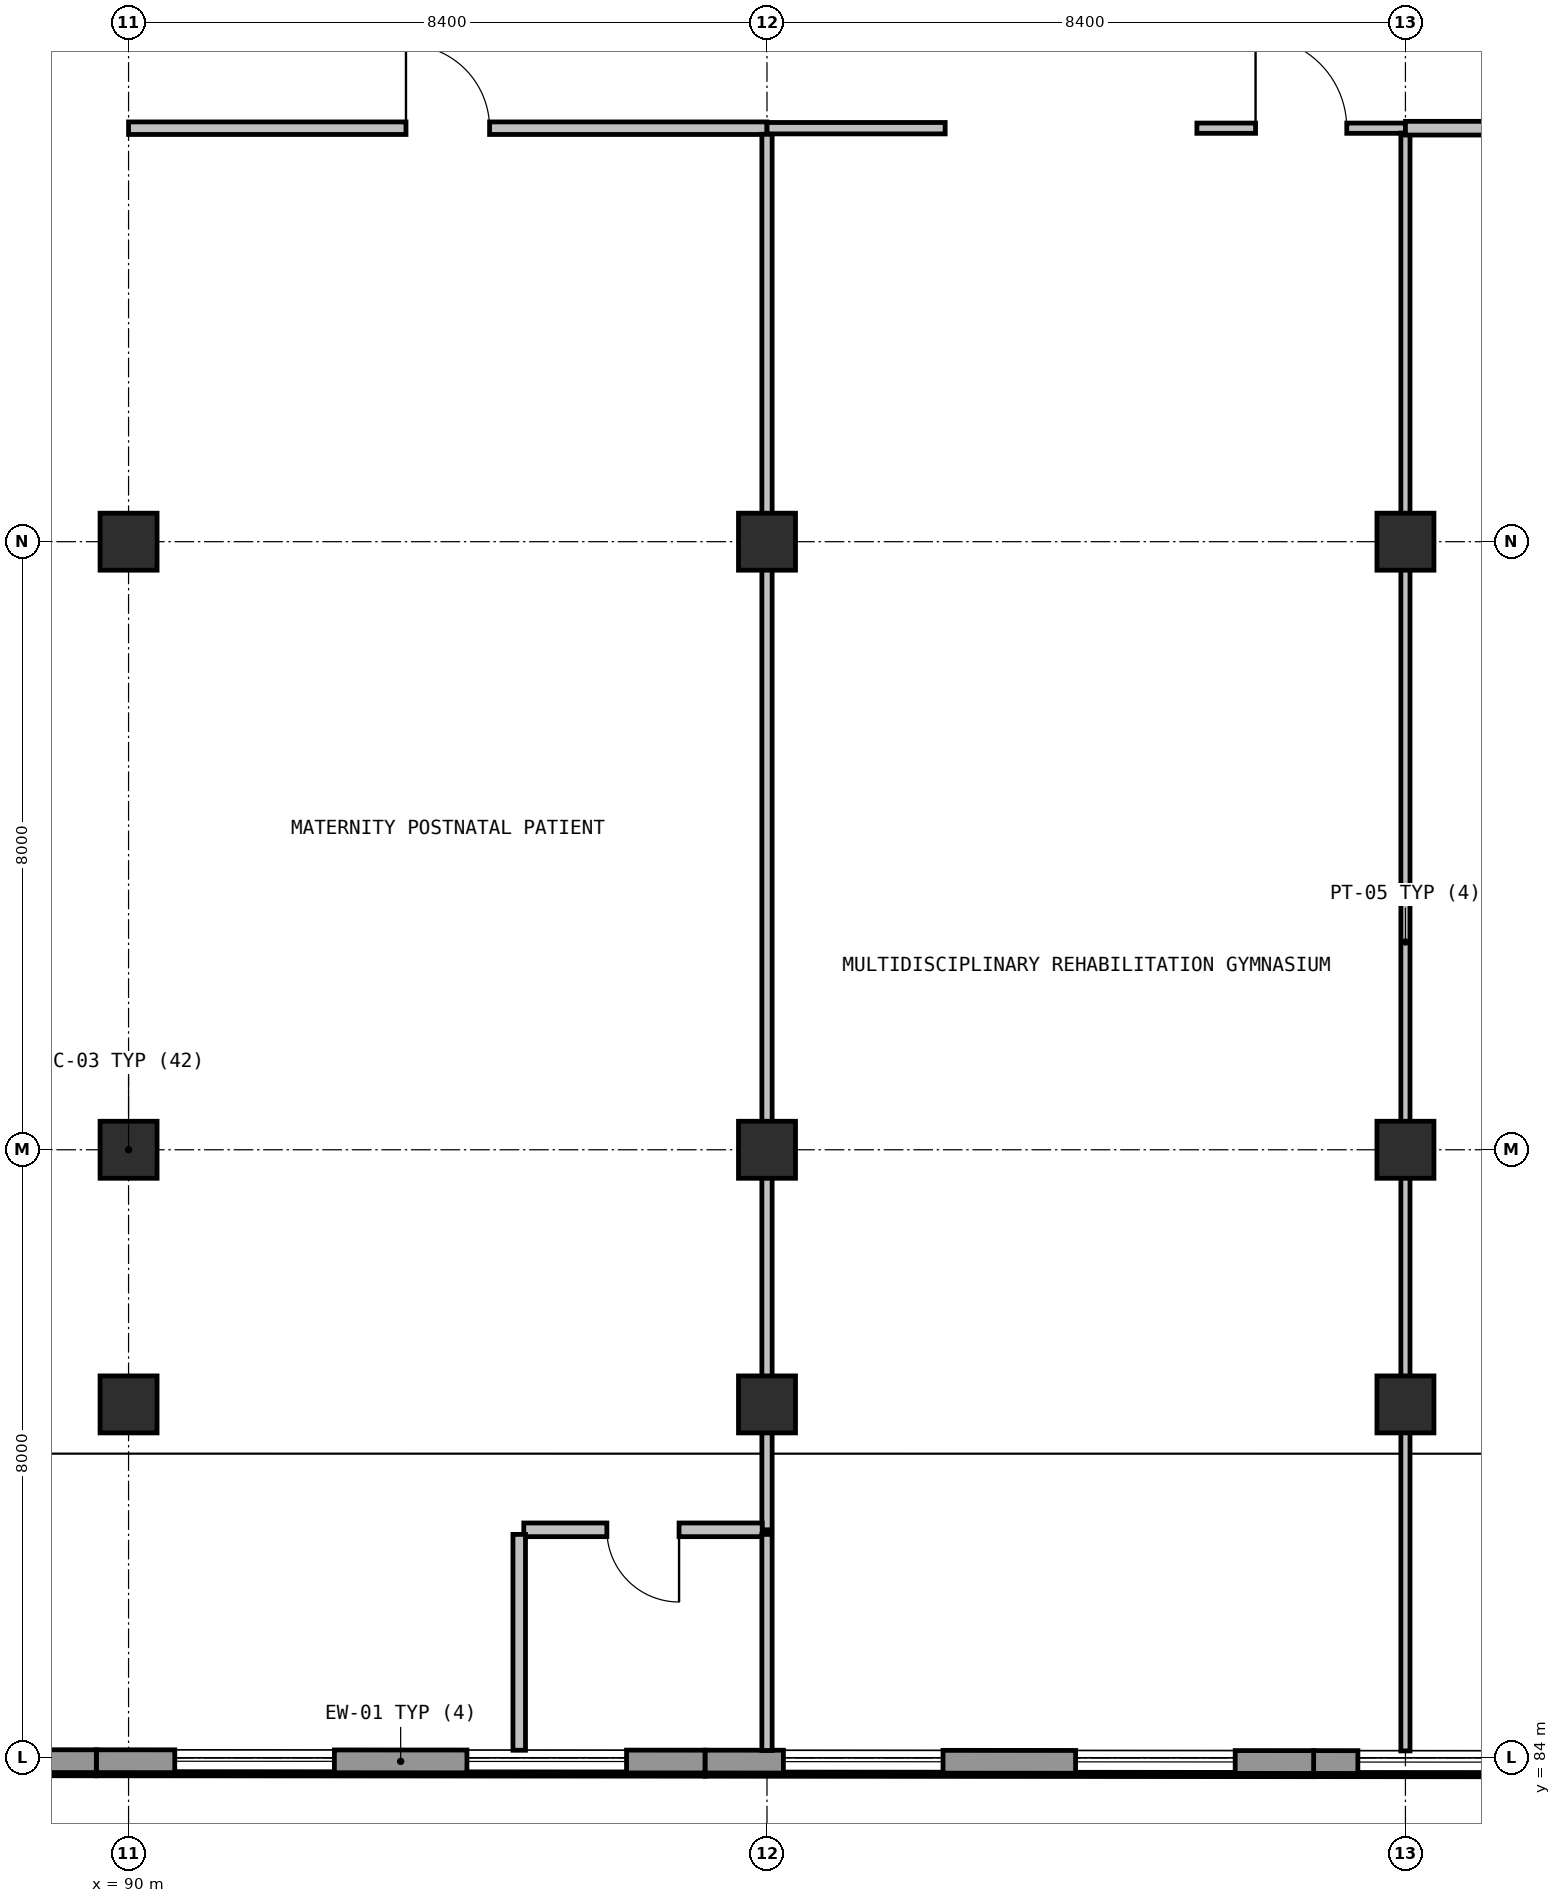
"""IFC4 building model, lengths in metres.
Left out: names, types, materials, properties, quantities, classifications, styles, units other than length and angle.
Written with IfcOpenShell. Run it as: python <this file> out.ifc"""

import sys

from ifc_helpers import new_model, si_unit, direction, frame, frame_2d, origin, origin_2d, place, context, subcontext, project, spatial, rectangle, extrude, element, fill, save


model = new_model("IFC4")
c1 = context("Model", 3, precision=1e-05, world=origin(), true_north=direction((0.0, 1.0)))
c2 = subcontext(c1, "Body", "Model", "MODEL_VIEW")
j1 = project(units=[si_unit("LENGTHUNIT", "METRE"), si_unit("PLANEANGLEUNIT", "RADIAN")], contexts=[c1])
p1 = place(None, origin())
s1 = spatial("IfcSite", under=j1, at=p1, CompositionType="ELEMENT")
p2 = place(p1, origin())
s2 = spatial("IfcBuilding", under=s1, at=p2, CompositionType="ELEMENT")
p3 = place(p2, frame((0.0, 0.0, 19.2)))
s3 = spatial("IfcBuildingStorey", under=s2, at=p3, CompositionType="ELEMENT", Elevation=19.2)
for number, where, z_axis, x_axis in (
    (1, (90.0, 88.65, 0.0), (0.0, 0.0, 1.0), (1.0, 0.0, 0.0)),
    (2, (90.0, 92.0, 0.0), (0.0, 0.0, 1.0), (1.0, 0.0, 0.0)),
    (3, (90.0, 100.0, 0.0), (0.0, 0.0, 1.0), (1.0, 0.0, 0.0)),
    (4, (98.4, 88.65, 0.0), (0.0, 0.0, 1.0), (1.0, 0.0, 0.0)),
    (5, (98.4, 92.0, 0.0), (0.0, 0.0, 1.0), (1.0, 0.0, 0.0)),
    (6, (98.4, 100.0, 0.0), (0.0, 0.0, 1.0), (1.0, 0.0, 0.0)),
    (7, (106.8, 88.65, 0.0), (0.0, 0.0, 1.0), (1.0, 0.0, 0.0)),
    (8, (106.8, 92.0, 0.0), (0.0, 0.0, 1.0), (1.0, 0.0, 0.0)),
    (9, (106.8, 100.0, 0.0), (0.0, 0.0, 1.0), (1.0, 0.0, 0.0)),
):
    element("IfcColumn", number, at=place(p3, frame(where, z_axis=z_axis, x_axis=x_axis)), inside=s3, PredefinedType="COLUMN", context=c2, shape_type="SweptSolid", body=[
        extrude(rectangle(XDim=0.75, YDim=0.75, at=origin_2d()), origin(), (0.0, 0.0, 1.0), 4.05),
    ])
p4 = place(p3, frame((113.6, 83.94, 0.0), z_axis=(0.0, 0.0, 1.0), x_axis=(-0.999999795056, 0.000640224252, 0.0)))
e10 = element("IfcWall", 10, at=p4, inside=s3, PredefinedType="SOLIDWALL", context=c2, shape_type="SweptSolid", body=[
    extrude(rectangle(XDim=8.008, YDim=0.3, at=frame_2d((4.004, 0.0))), origin(), (0.0, 0.0, 1.0), 3.77),
])
p5 = place(p4, frame((0.882, 0.0, 0.96)))
e11 = element("IfcOpeningElement", 11, at=p5, cuts=e10, PredefinedType="OPENING", context=c2, shape_type="SweptSolid", body=[
    extrude(rectangle(XDim=2.4, YDim=1.2, at=frame_2d((1.2, 0.6))), frame((0.0, 0.16, 0.0), z_axis=(0.0, -1.0, 0.0), x_axis=(1.0, 0.0, 0.0)), (0.0, 0.0, 1.0), 0.32),
])
p6 = place(p4, frame((4.426, 0.0, 0.96)))
e12 = element("IfcOpeningElement", 12, at=p6, cuts=e10, PredefinedType="OPENING", context=c2, shape_type="SweptSolid", body=[
    extrude(rectangle(XDim=3.0, YDim=1.35, at=frame_2d((1.5, 0.675))), frame((0.0, 0.16, 0.0), z_axis=(0.0, -1.0, 0.0), x_axis=(1.0, 0.0, 0.0)), (0.0, 0.0, 1.0), 0.32),
])
p7 = place(p3, frame((105.592, 83.945, 0.0), z_axis=(0.0, 0.0, 1.0), x_axis=(-0.999999732319, 0.000731684814, 0.0)))
e13 = element("IfcWall", 13, at=p7, inside=s3, PredefinedType="SOLIDWALL", context=c2, shape_type="SweptSolid", body=[
    extrude(rectangle(XDim=8.008, YDim=0.3, at=frame_2d((4.004, 0.0))), origin(), (0.0, 0.0, 1.0), 3.77),
])
p8 = place(p7, frame((1.032, 0.0, 0.96)))
e14 = element("IfcOpeningElement", 14, at=p8, cuts=e13, PredefinedType="OPENING", context=c2, shape_type="SweptSolid", body=[
    extrude(rectangle(XDim=2.1, YDim=1.5, at=frame_2d((1.05, 0.75))), frame((0.0, 0.16, 0.0), z_axis=(0.0, -1.0, 0.0), x_axis=(1.0, 0.0, 0.0)), (0.0, 0.0, 1.0), 0.32),
])
p9 = place(p7, frame((4.876, 0.0, 0.96)))
e15 = element("IfcOpeningElement", 15, at=p9, cuts=e13, PredefinedType="OPENING", context=c2, shape_type="SweptSolid", body=[
    extrude(rectangle(XDim=2.1, YDim=1.5, at=frame_2d((1.05, 0.75))), frame((0.0, 0.16, 0.0), z_axis=(0.0, -1.0, 0.0), x_axis=(1.0, 0.0, 0.0)), (0.0, 0.0, 1.0), 0.32),
])
p10 = place(p3, frame((97.584, 83.951, 0.0), z_axis=(0.0, 0.0, 1.0), x_axis=(-0.999999795056, 0.000640224252, 0.0)))
e16 = element("IfcWall", 16, at=p10, inside=s3, PredefinedType="SOLIDWALL", context=c2, shape_type="SweptSolid", body=[
    extrude(rectangle(XDim=8.008, YDim=0.3, at=frame_2d((4.004, 0.0))), origin(), (0.0, 0.0, 1.0), 3.77),
])
p11 = place(p10, frame((1.032, 0.0, 0.96)))
e17 = element("IfcOpeningElement", 17, at=p11, cuts=e16, PredefinedType="OPENING", context=c2, shape_type="SweptSolid", body=[
    extrude(rectangle(XDim=2.1, YDim=1.5, at=frame_2d((1.05, 0.75))), frame((0.0, 0.16, 0.0), z_axis=(0.0, -1.0, 0.0), x_axis=(1.0, 0.0, 0.0)), (0.0, 0.0, 1.0), 0.32),
])
p12 = place(p10, frame((4.876, 0.0, 0.96)))
e18 = element("IfcOpeningElement", 18, at=p12, cuts=e16, PredefinedType="OPENING", context=c2, shape_type="SweptSolid", body=[
    extrude(rectangle(XDim=2.1, YDim=1.5, at=frame_2d((1.05, 0.75))), frame((0.0, 0.16, 0.0), z_axis=(0.0, -1.0, 0.0), x_axis=(1.0, 0.0, 0.0)), (0.0, 0.0, 1.0), 0.32),
])
p13 = place(p3, frame((89.576, 83.956, 0.0), z_axis=(0.0, 0.0, 1.0), x_axis=(-0.999999814099, 0.000609755984, 0.0)))
e19 = element("IfcWall", 19, at=p13, inside=s3, PredefinedType="SOLIDWALL", context=c2, shape_type="SweptSolid", body=[
    extrude(rectangle(XDim=8.008, YDim=0.3, at=frame_2d((4.004, 0.0))), origin(), (0.0, 0.0, 1.0), 3.77),
])
p14 = place(p13, frame((1.032, 0.0, 0.96)))
e20 = element("IfcOpeningElement", 20, at=p14, cuts=e19, PredefinedType="OPENING", context=c2, shape_type="SweptSolid", body=[
    extrude(rectangle(XDim=2.1, YDim=1.5, at=frame_2d((1.05, 0.75))), frame((0.0, 0.16, 0.0), z_axis=(0.0, -1.0, 0.0), x_axis=(1.0, 0.0, 0.0)), (0.0, 0.0, 1.0), 0.32),
])
p15 = place(p13, frame((4.876, 0.0, 0.96)))
e21 = element("IfcOpeningElement", 21, at=p15, cuts=e19, PredefinedType="OPENING", context=c2, shape_type="SweptSolid", body=[
    extrude(rectangle(XDim=2.1, YDim=1.5, at=frame_2d((1.05, 0.75))), frame((0.0, 0.16, 0.0), z_axis=(0.0, -1.0, 0.0), x_axis=(1.0, 0.0, 0.0)), (0.0, 0.0, 1.0), 0.32),
])
p16 = place(p3, frame((90.0, 105.44, 0.0), z_axis=(0.0, 0.0, 1.0), x_axis=(1.0, 0.0, 0.0)))
e22 = element("IfcWall", 22, at=p16, inside=s3, PredefinedType="PARTITIONING", context=c2, shape_type="SweptSolid", body=[
    extrude(rectangle(XDim=8.4, YDim=0.165, at=frame_2d((4.2, 0.0))), origin(), (0.0, 0.0, 1.0), 3.77),
])
p17 = place(p16, frame((3.65, 0.0, 0.0)))
e23 = element("IfcOpeningElement", 23, at=p17, cuts=e22, PredefinedType="OPENING", context=c2, shape_type="SweptSolid", body=[
    extrude(rectangle(XDim=1.1, YDim=2.15, at=frame_2d((0.55, 1.075))), frame((0.0, 0.093, 0.0), z_axis=(0.0, -1.0, 0.0), x_axis=(1.0, 0.0, 0.0)), (0.0, 0.0, 1.0), 0.185),
])
p18 = place(p3, frame((98.4, 105.361, 0.0), z_axis=(0.0, 0.0, 1.0), x_axis=(0.0, -1.0, 0.0)))
e24 = element("IfcWall", 24, at=p18, inside=s3, PredefinedType="PARTITIONING", context=c2, shape_type="SweptSolid", body=[
    extrude(rectangle(XDim=18.361, YDim=0.135, at=frame_2d((9.181, 0.0))), origin(), (0.0, 0.0, 1.0), 3.12),
])
p19 = place(p3, frame((98.337, 87.0, 0.0), z_axis=(0.0, 0.0, 1.0), x_axis=(-1.0, 0.0, 0.0)))
e25 = element("IfcWall", 25, at=p19, inside=s3, PredefinedType="PARTITIONING", context=c2, shape_type="SweptSolid", body=[
    extrude(rectangle(XDim=3.137, YDim=0.18, at=frame_2d((1.568, 0.0))), origin(), (0.0, 0.0, 1.0), 3.77),
])
p20 = place(p19, frame((1.094, 0.0, 0.0)))
e26 = element("IfcOpeningElement", 26, at=p20, cuts=e25, PredefinedType="OPENING", context=c2, shape_type="SweptSolid", body=[
    extrude(rectangle(XDim=0.95, YDim=2.1, at=frame_2d((0.475, 1.05))), frame((0.0, 0.1, 0.0), z_axis=(0.0, -1.0, 0.0), x_axis=(1.0, 0.0, 0.0)), (0.0, 0.0, 1.0), 0.2),
])
p21 = place(p3, frame((95.14, 86.94, 0.0), z_axis=(0.0, 0.0, 1.0), x_axis=(0.0, -1.0, 0.0)))
e27 = element("IfcWall", 27, at=p21, inside=s3, PredefinedType="PARTITIONING", context=c2, shape_type="SweptSolid", body=[
    extrude(rectangle(XDim=2.84, YDim=0.165, at=frame_2d((1.42, 0.0))), origin(), (0.0, 0.0, 1.0), 3.77),
])
p22 = place(p3, frame((98.4, 86.94, 0.0), z_axis=(0.0, 0.0, 1.0), x_axis=(0.0, -1.0, 0.0)))
e28 = element("IfcWall", 28, at=p22, inside=s3, PredefinedType="PARTITIONING", context=c2, shape_type="SweptSolid", body=[
    extrude(rectangle(XDim=2.843, YDim=0.135, at=frame_2d((1.421, 0.0))), origin(), (0.0, 0.0, 1.0), 3.77),
])
p23 = place(p3, frame((98.4, 105.44, 0.0), z_axis=(0.0, 0.0, 1.0), x_axis=(1.0, 0.0, 0.0)))
e29 = element("IfcWall", 29, at=p23, inside=s3, PredefinedType="PARTITIONING", context=c2, shape_type="SweptSolid", body=[
    extrude(rectangle(XDim=2.344, YDim=0.15, at=frame_2d((1.172, 0.0))), origin(), (0.0, 0.0, 1.0), 3.77),
])
p24 = place(p3, frame((104.056, 105.44, 0.0), z_axis=(0.0, 0.0, 1.0), x_axis=(1.0, 0.0, 0.0)))
e30 = element("IfcWall", 30, at=p24, inside=s3, PredefinedType="PARTITIONING", context=c2, shape_type="SweptSolid", body=[
    extrude(rectangle(XDim=2.744, YDim=0.135, at=frame_2d((1.372, 0.0))), origin(), (0.0, 0.0, 1.0), 3.77),
])
p25 = place(p24, frame((0.772, 0.0, 0.0)))
e31 = element("IfcOpeningElement", 31, at=p25, cuts=e30, PredefinedType="OPENING", context=c2, shape_type="SweptSolid", body=[
    extrude(rectangle(XDim=1.2, YDim=2.15, at=frame_2d((0.6, 1.075))), frame((0.0, 0.077, 0.0), z_axis=(0.0, -1.0, 0.0), x_axis=(1.0, 0.0, 0.0)), (0.0, 0.0, 1.0), 0.155),
])
p26 = place(p3, frame((106.8, 105.376, 0.0), z_axis=(0.0, 0.0, 1.0), x_axis=(0.0, -1.0, 0.0)))
e32 = element("IfcWall", 32, at=p26, inside=s3, PredefinedType="PARTITIONING", context=c2, shape_type="SweptSolid", body=[
    extrude(rectangle(XDim=21.285, YDim=0.12, at=frame_2d((10.643, 0.0))), origin(), (0.0, 0.0, 1.0), 3.12),
])
p27 = place(p3, frame((106.8, 105.44, 0.0), z_axis=(0.0, 0.0, 1.0), x_axis=(1.0, 0.0, 0.0)))
e33 = element("IfcWall", 33, at=p27, inside=s3, PredefinedType="PARTITIONING", context=c2, shape_type="SweptSolid", body=[
    extrude(rectangle(XDim=6.744, YDim=0.18, at=frame_2d((3.372, 0.0))), origin(), (0.0, 0.0, 1.0), 3.77),
])
p28 = place(p6, origin())
e34 = element("IfcWindow", 34, at=p28, inside=s3, PartitioningType="SINGLE_PANEL", PredefinedType="WINDOW", context=c2, shape_type="SweptSolid", body=[
    extrude(rectangle(XDim=3.0, YDim=1.35, at=frame_2d((1.5, 0.675))), frame((0.0, 0.03, 0.0), z_axis=(0.0, -1.0, 0.0), x_axis=(1.0, 0.0, 0.0)), (0.0, 0.0, 1.0), 0.06),
])
fill(e12, e34)
p29 = place(p8, origin())
e35 = element("IfcWindow", 35, at=p29, inside=s3, PartitioningType="SINGLE_PANEL", PredefinedType="WINDOW", context=c2, shape_type="SweptSolid", body=[
    extrude(rectangle(XDim=2.1, YDim=1.5, at=frame_2d((1.05, 0.75))), frame((0.0, 0.03, 0.0), z_axis=(0.0, -1.0, 0.0), x_axis=(1.0, 0.0, 0.0)), (0.0, 0.0, 1.0), 0.06),
])
fill(e14, e35)
p30 = place(p9, origin())
e36 = element("IfcWindow", 36, at=p30, inside=s3, PartitioningType="SINGLE_PANEL", PredefinedType="WINDOW", context=c2, shape_type="SweptSolid", body=[
    extrude(rectangle(XDim=2.1, YDim=1.5, at=frame_2d((1.05, 0.75))), frame((0.0, 0.03, 0.0), z_axis=(0.0, -1.0, 0.0), x_axis=(1.0, 0.0, 0.0)), (0.0, 0.0, 1.0), 0.06),
])
fill(e15, e36)
p31 = place(p11, origin())
e37 = element("IfcWindow", 37, at=p31, inside=s3, PartitioningType="SINGLE_PANEL", PredefinedType="WINDOW", context=c2, shape_type="SweptSolid", body=[
    extrude(rectangle(XDim=2.1, YDim=1.5, at=frame_2d((1.05, 0.75))), frame((0.0, 0.03, 0.0), z_axis=(0.0, -1.0, 0.0), x_axis=(1.0, 0.0, 0.0)), (0.0, 0.0, 1.0), 0.06),
])
fill(e17, e37)
p32 = place(p12, origin())
e38 = element("IfcWindow", 38, at=p32, inside=s3, PartitioningType="SINGLE_PANEL", PredefinedType="WINDOW", context=c2, shape_type="SweptSolid", body=[
    extrude(rectangle(XDim=2.1, YDim=1.5, at=frame_2d((1.05, 0.75))), frame((0.0, 0.03, 0.0), z_axis=(0.0, -1.0, 0.0), x_axis=(1.0, 0.0, 0.0)), (0.0, 0.0, 1.0), 0.06),
])
fill(e18, e38)
p33 = place(p17, origin())
e39 = element("IfcDoor", 39, at=p33, inside=s3, OperationType="SINGLE_SWING_RIGHT", PredefinedType="DOOR", context=c2, shape_type="SweptSolid", body=[
    extrude(rectangle(XDim=1.1, YDim=2.15, at=frame_2d((0.55, 1.075))), frame((0.0, 0.025, 0.0), z_axis=(0.0, -1.0, 0.0), x_axis=(1.0, 0.0, 0.0)), (0.0, 0.0, 1.0), 0.05),
])
fill(e23, e39)
p34 = place(p20, origin())
e40 = element("IfcDoor", 40, at=p34, inside=s3, OperationType="SINGLE_SWING_LEFT", PredefinedType="DOOR", context=c2, shape_type="SweptSolid", body=[
    extrude(rectangle(XDim=0.95, YDim=2.1, at=frame_2d((0.475, 1.05))), frame((0.0, 0.025, 0.0), z_axis=(0.0, -1.0, 0.0), x_axis=(1.0, 0.0, 0.0)), (0.0, 0.0, 1.0), 0.05),
])
fill(e26, e40)
p35 = place(p25, origin())
e41 = element("IfcDoor", 41, at=p35, inside=s3, OperationType="SINGLE_SWING_RIGHT", PredefinedType="DOOR", context=c2, shape_type="SweptSolid", body=[
    extrude(rectangle(XDim=1.2, YDim=2.15, at=frame_2d((0.6, 1.075))), frame((0.0, 0.025, 0.0), z_axis=(0.0, -1.0, 0.0), x_axis=(1.0, 0.0, 0.0)), (0.0, 0.0, 1.0), 0.05),
])
fill(e31, e41)
save(model, sys.argv[1])
